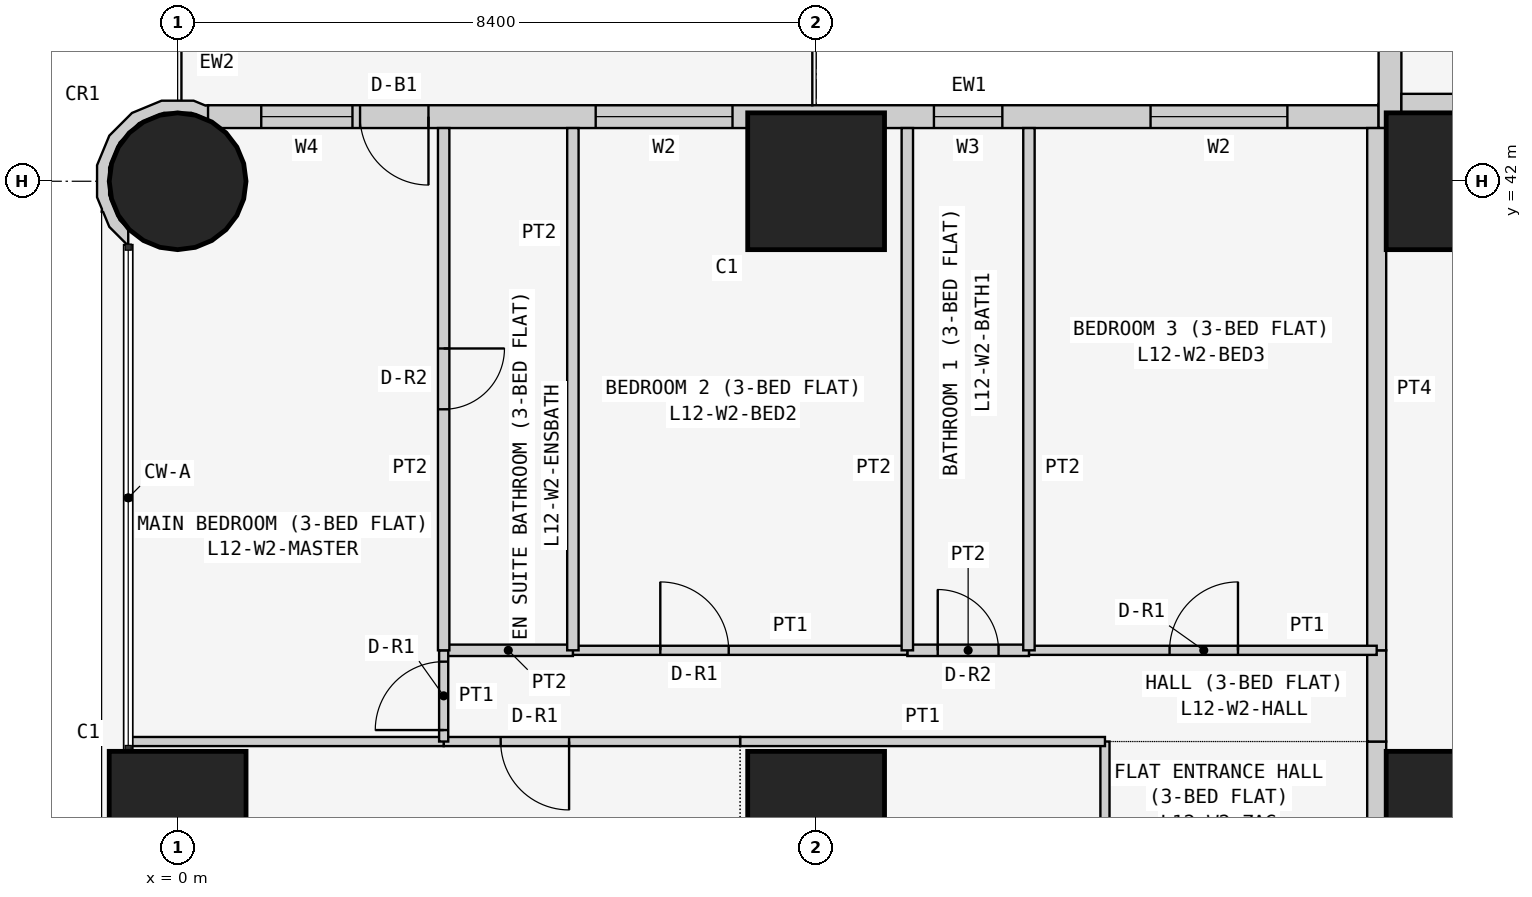
"""IFC4 building model, lengths in metres.
Left out: names, types, materials, properties, quantities, classifications, styles, units other than length and angle.
Written with IfcOpenShell. Run it as: python <this file> out.ifc"""

import sys

from ifc_helpers import new_model, si_unit, direction, frame, frame_2d, origin, origin_2d, place, context, subcontext, project, spatial, polyline, rectangle, circle, outline, extrude, element, fill, save


model = new_model("IFC4")
c1 = context("Model", 3, precision=1e-05, world=origin(), true_north=direction((0.0, 1.0)))
c2 = subcontext(c1, "Body", "Model", "MODEL_VIEW")
j1 = project(units=[si_unit("LENGTHUNIT", "METRE"), si_unit("PLANEANGLEUNIT", "RADIAN")], contexts=[c1])
p1 = place(None, origin())
s1 = spatial("IfcSite", under=j1, at=p1, CompositionType="ELEMENT")
p2 = place(p1, origin())
s2 = spatial("IfcBuilding", under=s1, at=p2, CompositionType="ELEMENT")
p3 = place(p2, frame((0.0, 0.0, 52.5)))
s3 = spatial("IfcBuildingStorey", under=s2, at=p3, CompositionType="ELEMENT", Elevation=52.5)
p4 = place(p3, frame((0.0, 33.6, 0.0), z_axis=(0.0, 0.0, 1.0), x_axis=(1.0, 0.0, 0.0)))
e1 = element("IfcColumn", 1, at=p4, inside=s3, PredefinedType="COLUMN", context=c2, shape_type="SweptSolid", body=[
    extrude(rectangle(XDim=1.8, YDim=1.8, at=origin_2d()), origin(), (0.0, 0.0, 1.0), 3.6),
])
p5 = place(p3, frame((0.0, 42.0, 0.0), z_axis=(0.0, 0.0, 1.0), x_axis=(1.0, 0.0, 0.0)))
e2 = element("IfcColumn", 2, at=p5, inside=s3, PredefinedType="COLUMN", context=c2, shape_type="SweptSolid", body=[
    extrude(circle(Radius=0.9, at=origin_2d()), origin(), (0.0, 0.0, 1.0), 3.6),
])
for number, where, z_axis, x_axis in (
    (3, (8.4, 33.6, 0.0), (0.0, 0.0, 1.0), (1.0, 0.0, 0.0)),
    (4, (8.4, 42.0, 0.0), (0.0, 0.0, 1.0), (1.0, 0.0, 0.0)),
    (5, (16.8, 33.6, 0.0), (0.0, 0.0, 1.0), (1.0, 0.0, 0.0)),
    (6, (16.8, 42.0, 0.0), (0.0, 0.0, 1.0), (1.0, 0.0, 0.0)),
):
    element("IfcColumn", number, at=place(p3, frame(where, z_axis=z_axis, x_axis=x_axis)), inside=s3, PredefinedType="COLUMN", context=c2, shape_type="SweptSolid", body=[
        extrude(rectangle(XDim=1.8, YDim=1.8, at=origin_2d()), origin(), (0.0, 0.0, 1.0), 3.6),
    ])
p6 = place(p3, frame((15.8, 42.85, 0.0), z_axis=(0.0, 0.0, 1.0), x_axis=(-1.0, 0.0, 0.0)))
e7 = element("IfcWall", 7, at=p6, inside=s3, PredefinedType="SOLIDWALL", context=c2, shape_type="SweptSolid", body=[
    extrude(rectangle(XDim=15.4, YDim=0.3, at=frame_2d((7.7, 0.0))), origin(), (0.0, 0.0, 1.0), 3.45),
])
p7 = place(p6, frame((1.2, 0.0, 0.9)))
e8 = element("IfcOpeningElement", 8, at=p7, cuts=e7, PredefinedType="OPENING", context=c2, shape_type="SweptSolid", body=[
    extrude(rectangle(XDim=1.8, YDim=1.5, at=frame_2d((0.9, 0.75))), frame((0.0, 0.16, 0.0), z_axis=(0.0, -1.0, 0.0), x_axis=(1.0, 0.0, 0.0)), (0.0, 0.0, 1.0), 0.32),
])
p8 = place(p6, frame((4.95, 0.0, 1.5)))
e9 = element("IfcOpeningElement", 9, at=p8, cuts=e7, PredefinedType="OPENING", context=c2, shape_type="SweptSolid", body=[
    extrude(rectangle(XDim=0.9, YDim=0.7, at=frame_2d((0.45, 0.35))), frame((0.0, 0.16, 0.0), z_axis=(0.0, -1.0, 0.0), x_axis=(1.0, 0.0, 0.0)), (0.0, 0.0, 1.0), 0.32),
])
p9 = place(p6, frame((8.5, 0.0, 0.9)))
e10 = element("IfcOpeningElement", 10, at=p9, cuts=e7, PredefinedType="OPENING", context=c2, shape_type="SweptSolid", body=[
    extrude(rectangle(XDim=1.8, YDim=1.5, at=frame_2d((0.9, 0.75))), frame((0.0, 0.16, 0.0), z_axis=(0.0, -1.0, 0.0), x_axis=(1.0, 0.0, 0.0)), (0.0, 0.0, 1.0), 0.32),
])
p10 = place(p6, frame((12.5, 0.0, 0.0)))
e11 = element("IfcOpeningElement", 11, at=p10, cuts=e7, PredefinedType="OPENING", context=c2, shape_type="SweptSolid", body=[
    extrude(rectangle(XDim=0.9, YDim=2.4, at=frame_2d((0.45, 1.2))), frame((0.0, 0.16, 0.0), z_axis=(0.0, -1.0, 0.0), x_axis=(1.0, 0.0, 0.0)), (0.0, 0.0, 1.0), 0.32),
])
p11 = place(p6, frame((13.5, 0.0, 0.9)))
e12 = element("IfcOpeningElement", 12, at=p11, cuts=e7, PredefinedType="OPENING", context=c2, shape_type="SweptSolid", body=[
    extrude(rectangle(XDim=1.2, YDim=1.5, at=frame_2d((0.6, 0.75))), frame((0.0, 0.16, 0.0), z_axis=(0.0, -1.0, 0.0), x_axis=(1.0, 0.0, 0.0)), (0.0, 0.0, 1.0), 0.32),
])
p12 = place(p3, frame((15.95, 58.4, 0.0), z_axis=(0.0, 0.0, 1.0), x_axis=(0.0, -1.0, 0.0)))
e13 = element("IfcWall", 13, at=p12, inside=s3, PredefinedType="SOLIDWALL", context=c2, shape_type="SweptSolid", body=[
    extrude(rectangle(XDim=15.7, YDim=0.3, at=frame_2d((7.85, 0.0))), origin(), (0.0, 0.0, 1.0), 3.45),
])
p13 = place(p12, frame((12.4, 0.0, 0.9)))
e14 = element("IfcOpeningElement", 14, at=p13, cuts=e13, PredefinedType="OPENING", context=c2, shape_type="SweptSolid", body=[
    extrude(rectangle(XDim=1.8, YDim=1.5, at=frame_2d((0.9, 0.75))), frame((0.0, 0.16, 0.0), z_axis=(0.0, -1.0, 0.0), x_axis=(1.0, 0.0, 0.0)), (0.0, 0.0, 1.0), 0.32),
])
p14 = place(p12, frame((9.55, 0.0, 1.5)))
e15 = element("IfcOpeningElement", 15, at=p14, cuts=e13, PredefinedType="OPENING", context=c2, shape_type="SweptSolid", body=[
    extrude(rectangle(XDim=0.9, YDim=0.7, at=frame_2d((0.45, 0.35))), frame((0.0, 0.16, 0.0), z_axis=(0.0, -1.0, 0.0), x_axis=(1.0, 0.0, 0.0)), (0.0, 0.0, 1.0), 0.32),
])
p15 = place(p12, frame((5.1, 0.0, 0.9)))
e16 = element("IfcOpeningElement", 16, at=p15, cuts=e13, PredefinedType="OPENING", context=c2, shape_type="SweptSolid", body=[
    extrude(rectangle(XDim=1.8, YDim=1.5, at=frame_2d((0.9, 0.75))), frame((0.0, 0.16, 0.0), z_axis=(0.0, -1.0, 0.0), x_axis=(1.0, 0.0, 0.0)), (0.0, 0.0, 1.0), 0.32),
])
p16 = place(p12, frame((2.0, 0.0, 0.0)))
e17 = element("IfcOpeningElement", 17, at=p16, cuts=e13, PredefinedType="OPENING", context=c2, shape_type="SweptSolid", body=[
    extrude(rectangle(XDim=0.9, YDim=2.4, at=frame_2d((0.45, 1.2))), frame((0.0, 0.16, 0.0), z_axis=(0.0, -1.0, 0.0), x_axis=(1.0, 0.0, 0.0)), (0.0, 0.0, 1.0), 0.32),
])
p17 = place(p12, frame((0.7, 0.0, 0.9)))
e18 = element("IfcOpeningElement", 18, at=p17, cuts=e13, PredefinedType="OPENING", context=c2, shape_type="SweptSolid", body=[
    extrude(rectangle(XDim=1.2, YDim=1.5, at=frame_2d((0.6, 0.75))), frame((0.0, 0.16, 0.0), z_axis=(0.0, -1.0, 0.0), x_axis=(1.0, 0.0, 0.0)), (0.0, 0.0, 1.0), 0.32),
])
p18 = place(p3, frame((0.364, 42.91, 0.0), z_axis=(0.0, 0.0, 1.0), x_axis=(-0.926129809145, 0.377204953059, 0.0)))
e19 = element("IfcWall", 19, at=p18, inside=s3, PredefinedType="SOLIDWALL", context=c2, shape_type="SweptSolid", body=[
    extrude(outline(polyline([(0.36, 1.803), (0.509, 1.741), (0.761, 1.486), (0.896, 1.154), (0.894, 0.795), (0.755, 0.465), (0.5, 0.213), (0.168, 0.078), (-0.1, 0.08), (0.001, -0.097), (0.03, -0.08), (0.199, -0.081), (0.589, 0.078), (0.889, 0.374), (1.053, 0.763), (1.055, 1.185), (0.896, 1.575), (0.778, 1.695), (0.769, 1.728), (0.75, 1.723), (0.6, 1.875), (0.295, 2.003), (0.281, 1.998), (0.36, 1.803)])), origin(), (0.0, 0.0, 1.0), 3.45),
])
p19 = place(p3, frame((16.1, 43.025, 0.0), z_axis=(0.0, 0.0, 1.0), x_axis=(1.0, 0.0, 0.0)))
e20 = element("IfcWall", 20, at=p19, inside=s3, PredefinedType="PARTITIONING", context=c2, shape_type="SweptSolid", body=[
    extrude(rectangle(XDim=6.871, YDim=0.25, at=frame_2d((3.436, 0.0))), origin(), (0.0, 0.0, 1.0), 3.45),
])
p20 = place(p3, frame((15.775, 29.4, 0.0), z_axis=(0.0, 0.0, 1.0), x_axis=(0.0, 1.0, 0.0)))
e21 = element("IfcWall", 21, at=p20, inside=s3, PredefinedType="PARTITIONING", context=c2, shape_type="SweptSolid", body=[
    extrude(rectangle(XDim=5.229, YDim=0.25, at=frame_2d((2.615, 0.0))), origin(), (0.0, 0.0, 1.0), 3.45),
])
p21 = place(p20, frame((2.1, 0.0, 0.0)))
e22 = element("IfcOpeningElement", 22, at=p21, cuts=e21, PredefinedType="OPENING", context=c2, shape_type="SweptSolid", body=[
    extrude(rectangle(XDim=1.0, YDim=2.1, at=frame_2d((0.5, 1.05))), frame((0.0, 0.135, 0.0), z_axis=(0.0, -1.0, 0.0), x_axis=(1.0, 0.0, 0.0)), (0.0, 0.0, 1.0), 0.27),
])
p22 = place(p3, frame((15.775, 34.629, 0.0), z_axis=(0.0, 0.0, 1.0), x_axis=(0.0, 1.0, 0.0)))
e23 = element("IfcWall", 23, at=p22, inside=s3, PredefinedType="PARTITIONING", context=c2, shape_type="SweptSolid", body=[
    extrude(rectangle(XDim=1.2, YDim=0.25, at=frame_2d((0.6, 0.0))), origin(), (0.0, 0.0, 1.0), 3.45),
])
p23 = place(p3, frame((15.775, 35.829, 0.0), z_axis=(0.0, 0.0, 1.0), x_axis=(0.0, 1.0, 0.0)))
e24 = element("IfcWall", 24, at=p23, inside=s3, PredefinedType="PARTITIONING", context=c2, shape_type="SweptSolid", body=[
    extrude(rectangle(XDim=6.871, YDim=0.25, at=frame_2d((3.436, 0.0))), origin(), (0.0, 0.0, 1.0), 3.45),
])
p24 = place(p3, frame((12.2, 29.4, 0.0), z_axis=(0.0, 0.0, 1.0), x_axis=(0.0, 1.0, 0.0)))
e25 = element("IfcWall", 25, at=p24, inside=s3, PredefinedType="PARTITIONING", context=c2, shape_type="SweptSolid", body=[
    extrude(rectangle(XDim=5.229, YDim=0.12, at=frame_2d((2.615, 0.0))), origin(), (0.0, 0.0, 1.0), 3.45),
])
p25 = place(p24, frame((1.05, 0.0, 0.0)))
e26 = element("IfcOpeningElement", 26, at=p25, cuts=e25, PredefinedType="OPENING", context=c2, shape_type="SweptSolid", body=[
    extrude(rectangle(XDim=0.9, YDim=2.1, at=frame_2d((0.45, 1.05))), frame((0.0, 0.07, 0.0), z_axis=(0.0, -1.0, 0.0), x_axis=(1.0, 0.0, 0.0)), (0.0, 0.0, 1.0), 0.14),
])
p26 = place(p3, frame((7.4, 34.629, 0.0), z_axis=(0.0, 0.0, 1.0), x_axis=(1.0, 0.0, 0.0)))
e27 = element("IfcWall", 27, at=p26, inside=s3, PredefinedType="PARTITIONING", context=c2, shape_type="SweptSolid", body=[
    extrude(rectangle(XDim=4.8, YDim=0.12, at=frame_2d((2.4, 0.0))), origin(), (0.0, 0.0, 1.0), 3.45),
])
p27 = place(p3, frame((3.5, 34.629, 0.0), z_axis=(0.0, 0.0, 1.0), x_axis=(1.0, 0.0, 0.0)))
e28 = element("IfcWall", 28, at=p27, inside=s3, PredefinedType="PARTITIONING", context=c2, shape_type="SweptSolid", body=[
    extrude(rectangle(XDim=3.9, YDim=0.12, at=frame_2d((1.95, 0.0))), origin(), (0.0, 0.0, 1.0), 3.45),
])
p28 = place(p27, frame((0.75, 0.0, 0.0)))
e29 = element("IfcOpeningElement", 29, at=p28, cuts=e28, PredefinedType="OPENING", context=c2, shape_type="SweptSolid", body=[
    extrude(rectangle(XDim=0.9, YDim=2.1, at=frame_2d((0.45, 1.05))), frame((0.0, 0.07, 0.0), z_axis=(0.0, -1.0, 0.0), x_axis=(1.0, 0.0, 0.0)), (0.0, 0.0, 1.0), 0.14),
])
p29 = place(p3, frame((-0.65, 34.629, 0.0), z_axis=(0.0, 0.0, 1.0), x_axis=(1.0, 0.0, 0.0)))
e30 = element("IfcWall", 30, at=p29, inside=s3, PredefinedType="PARTITIONING", context=c2, shape_type="SweptSolid", body=[
    extrude(rectangle(XDim=4.15, YDim=0.12, at=frame_2d((2.075, 0.0))), origin(), (0.0, 0.0, 1.0), 3.45),
])
p30 = place(p3, frame((11.2, 35.829, 0.0), z_axis=(0.0, 0.0, 1.0), x_axis=(1.0, 0.0, 0.0)))
e31 = element("IfcWall", 31, at=p30, inside=s3, PredefinedType="PARTITIONING", context=c2, shape_type="SweptSolid", body=[
    extrude(rectangle(XDim=4.575, YDim=0.12, at=frame_2d((2.288, 0.0))), origin(), (0.0, 0.0, 1.0), 3.45),
])
p31 = place(p30, frame((1.85, 0.0, 0.0)))
e32 = element("IfcOpeningElement", 32, at=p31, cuts=e31, PredefinedType="OPENING", context=c2, shape_type="SweptSolid", body=[
    extrude(rectangle(XDim=0.9, YDim=2.1, at=frame_2d((0.45, 1.05))), frame((0.0, 0.07, 0.0), z_axis=(0.0, -1.0, 0.0), x_axis=(1.0, 0.0, 0.0)), (0.0, 0.0, 1.0), 0.14),
])
p32 = place(p3, frame((9.6, 35.829, 0.0), z_axis=(0.0, 0.0, 1.0), x_axis=(1.0, 0.0, 0.0)))
e33 = element("IfcWall", 33, at=p32, inside=s3, PredefinedType="PARTITIONING", context=c2, shape_type="SweptSolid", body=[
    extrude(rectangle(XDim=1.6, YDim=0.15, at=frame_2d((0.8, 0.0))), origin(), (0.0, 0.0, 1.0), 3.45),
])
p33 = place(p32, frame((0.4, 0.0, 0.0)))
e34 = element("IfcOpeningElement", 34, at=p33, cuts=e33, PredefinedType="OPENING", context=c2, shape_type="SweptSolid", body=[
    extrude(rectangle(XDim=0.8, YDim=2.1, at=frame_2d((0.4, 1.05))), frame((0.0, 0.085, 0.0), z_axis=(0.0, -1.0, 0.0), x_axis=(1.0, 0.0, 0.0)), (0.0, 0.0, 1.0), 0.17),
])
p34 = place(p3, frame((5.2, 35.829, 0.0), z_axis=(0.0, 0.0, 1.0), x_axis=(1.0, 0.0, 0.0)))
e35 = element("IfcWall", 35, at=p34, inside=s3, PredefinedType="PARTITIONING", context=c2, shape_type="SweptSolid", body=[
    extrude(rectangle(XDim=4.4, YDim=0.12, at=frame_2d((2.2, 0.0))), origin(), (0.0, 0.0, 1.0), 3.45),
])
p35 = place(p34, frame((1.15, 0.0, 0.0)))
e36 = element("IfcOpeningElement", 36, at=p35, cuts=e35, PredefinedType="OPENING", context=c2, shape_type="SweptSolid", body=[
    extrude(rectangle(XDim=0.9, YDim=2.1, at=frame_2d((0.45, 1.05))), frame((0.0, 0.07, 0.0), z_axis=(0.0, -1.0, 0.0), x_axis=(1.0, 0.0, 0.0)), (0.0, 0.0, 1.0), 0.14),
])
p36 = place(p3, frame((3.5, 35.829, 0.0), z_axis=(0.0, 0.0, 1.0), x_axis=(1.0, 0.0, 0.0)))
e37 = element("IfcWall", 37, at=p36, inside=s3, PredefinedType="PARTITIONING", context=c2, shape_type="SweptSolid", body=[
    extrude(rectangle(XDim=1.7, YDim=0.15, at=frame_2d((0.85, 0.0))), origin(), (0.0, 0.0, 1.0), 3.45),
])
p37 = place(p3, frame((3.5, 34.629, 0.0), z_axis=(0.0, 0.0, 1.0), x_axis=(0.0, 1.0, 0.0)))
e38 = element("IfcWall", 38, at=p37, inside=s3, PredefinedType="PARTITIONING", context=c2, shape_type="SweptSolid", body=[
    extrude(rectangle(XDim=1.2, YDim=0.12, at=frame_2d((0.6, 0.0))), origin(), (0.0, 0.0, 1.0), 3.45),
])
p38 = place(p37, frame((0.151, 0.0, 0.0)))
e39 = element("IfcOpeningElement", 39, at=p38, cuts=e38, PredefinedType="OPENING", context=c2, shape_type="SweptSolid", body=[
    extrude(rectangle(XDim=0.9, YDim=2.1, at=frame_2d((0.45, 1.05))), frame((0.0, 0.07, 0.0), z_axis=(0.0, -1.0, 0.0), x_axis=(1.0, 0.0, 0.0)), (0.0, 0.0, 1.0), 0.14),
])
for number, where, z_axis, x_axis in (
    (40, (11.2, 35.829, 0.0), (0.0, 0.0, 1.0), (0.0, 1.0, 0.0)),
    (41, (9.6, 35.829, 0.0), (0.0, 0.0, 1.0), (0.0, 1.0, 0.0)),
    (42, (5.2, 35.829, 0.0), (0.0, 0.0, 1.0), (0.0, 1.0, 0.0)),
):
    element("IfcWall", number, at=place(p3, frame(where, z_axis=z_axis, x_axis=x_axis)), inside=s3, PredefinedType="PARTITIONING", context=c2, shape_type="SweptSolid", body=[
        extrude(rectangle(XDim=6.871, YDim=0.15, at=frame_2d((3.436, 0.0))), origin(), (0.0, 0.0, 1.0), 3.45),
    ])
p39 = place(p3, frame((3.5, 35.829, 0.0), z_axis=(0.0, 0.0, 1.0), x_axis=(0.0, 1.0, 0.0)))
e43 = element("IfcWall", 43, at=p39, inside=s3, PredefinedType="PARTITIONING", context=c2, shape_type="SweptSolid", body=[
    extrude(rectangle(XDim=6.871, YDim=0.15, at=frame_2d((3.436, 0.0))), origin(), (0.0, 0.0, 1.0), 3.45),
])
p40 = place(p39, frame((3.171, 0.0, 0.0)))
e44 = element("IfcOpeningElement", 44, at=p40, cuts=e43, PredefinedType="OPENING", context=c2, shape_type="SweptSolid", body=[
    extrude(rectangle(XDim=0.8, YDim=2.1, at=frame_2d((0.4, 1.05))), frame((0.0, 0.085, 0.0), z_axis=(0.0, -1.0, 0.0), x_axis=(1.0, 0.0, 0.0)), (0.0, 0.0, 1.0), 0.17),
])
p41 = place(p7, origin())
e45 = element("IfcWindow", 45, at=p41, inside=s3, PartitioningType="SINGLE_PANEL", PredefinedType="WINDOW", context=c2, shape_type="SweptSolid", body=[
    extrude(rectangle(XDim=1.8, YDim=1.5, at=frame_2d((0.9, 0.75))), frame((0.0, 0.03, 0.0), z_axis=(0.0, -1.0, 0.0), x_axis=(1.0, 0.0, 0.0)), (0.0, 0.0, 1.0), 0.06),
])
fill(e8, e45)
p42 = place(p8, origin())
e46 = element("IfcWindow", 46, at=p42, inside=s3, PartitioningType="SINGLE_PANEL", PredefinedType="WINDOW", context=c2, shape_type="SweptSolid", body=[
    extrude(rectangle(XDim=0.9, YDim=0.7, at=frame_2d((0.45, 0.35))), frame((0.0, 0.03, 0.0), z_axis=(0.0, -1.0, 0.0), x_axis=(1.0, 0.0, 0.0)), (0.0, 0.0, 1.0), 0.06),
])
fill(e9, e46)
p43 = place(p9, origin())
e47 = element("IfcWindow", 47, at=p43, inside=s3, PartitioningType="SINGLE_PANEL", PredefinedType="WINDOW", context=c2, shape_type="SweptSolid", body=[
    extrude(rectangle(XDim=1.8, YDim=1.5, at=frame_2d((0.9, 0.75))), frame((0.0, 0.03, 0.0), z_axis=(0.0, -1.0, 0.0), x_axis=(1.0, 0.0, 0.0)), (0.0, 0.0, 1.0), 0.06),
])
fill(e10, e47)
p44 = place(p10, origin())
e48 = element("IfcDoor", 48, at=p44, inside=s3, OperationType="SINGLE_SWING_LEFT", PredefinedType="DOOR", context=c2, shape_type="SweptSolid", body=[
    extrude(rectangle(XDim=0.9, YDim=2.4, at=frame_2d((0.45, 1.2))), frame((0.0, 0.025, 0.0), z_axis=(0.0, -1.0, 0.0), x_axis=(1.0, 0.0, 0.0)), (0.0, 0.0, 1.0), 0.05),
])
fill(e11, e48)
p45 = place(p11, origin())
e49 = element("IfcWindow", 49, at=p45, inside=s3, PartitioningType="SINGLE_PANEL", PredefinedType="WINDOW", context=c2, shape_type="SweptSolid", body=[
    extrude(rectangle(XDim=1.2, YDim=1.5, at=frame_2d((0.6, 0.75))), frame((0.0, 0.03, 0.0), z_axis=(0.0, -1.0, 0.0), x_axis=(1.0, 0.0, 0.0)), (0.0, 0.0, 1.0), 0.06),
])
fill(e12, e49)
p46 = place(p28, frame((0.9, 0.0, 0.0), z_axis=(0.0, 0.0, 1.0), x_axis=(-1.0, 0.0, 0.0)))
e50 = element("IfcDoor", 50, at=p46, inside=s3, OperationType="SINGLE_SWING_LEFT", PredefinedType="DOOR", context=c2, shape_type="SweptSolid", body=[
    extrude(rectangle(XDim=0.9, YDim=2.1, at=frame_2d((0.45, 1.05))), frame((0.0, 0.025, 0.0), z_axis=(0.0, -1.0, 0.0), x_axis=(1.0, 0.0, 0.0)), (0.0, 0.0, 1.0), 0.05),
])
fill(e29, e50)
p47 = place(p31, origin())
e51 = element("IfcDoor", 51, at=p47, inside=s3, OperationType="SINGLE_SWING_RIGHT", PredefinedType="DOOR", context=c2, shape_type="SweptSolid", body=[
    extrude(rectangle(XDim=0.9, YDim=2.1, at=frame_2d((0.45, 1.05))), frame((0.0, 0.025, 0.0), z_axis=(0.0, -1.0, 0.0), x_axis=(1.0, 0.0, 0.0)), (0.0, 0.0, 1.0), 0.05),
])
fill(e32, e51)
p48 = place(p33, origin())
e52 = element("IfcDoor", 52, at=p48, inside=s3, OperationType="SINGLE_SWING_LEFT", PredefinedType="DOOR", context=c2, shape_type="SweptSolid", body=[
    extrude(rectangle(XDim=0.8, YDim=2.1, at=frame_2d((0.4, 1.05))), frame((0.0, 0.025, 0.0), z_axis=(0.0, -1.0, 0.0), x_axis=(1.0, 0.0, 0.0)), (0.0, 0.0, 1.0), 0.05),
])
fill(e34, e52)
p49 = place(p35, origin())
e53 = element("IfcDoor", 53, at=p49, inside=s3, OperationType="SINGLE_SWING_LEFT", PredefinedType="DOOR", context=c2, shape_type="SweptSolid", body=[
    extrude(rectangle(XDim=0.9, YDim=2.1, at=frame_2d((0.45, 1.05))), frame((0.0, 0.025, 0.0), z_axis=(0.0, -1.0, 0.0), x_axis=(1.0, 0.0, 0.0)), (0.0, 0.0, 1.0), 0.05),
])
fill(e36, e53)
p50 = place(p38, origin())
e54 = element("IfcDoor", 54, at=p50, inside=s3, OperationType="SINGLE_SWING_LEFT", PredefinedType="DOOR", context=c2, shape_type="SweptSolid", body=[
    extrude(rectangle(XDim=0.9, YDim=2.1, at=frame_2d((0.45, 1.05))), frame((0.0, 0.025, 0.0), z_axis=(0.0, -1.0, 0.0), x_axis=(1.0, 0.0, 0.0)), (0.0, 0.0, 1.0), 0.05),
])
fill(e39, e54)
p51 = place(p40, frame((0.8, 0.0, 0.0), z_axis=(0.0, 0.0, 1.0), x_axis=(-1.0, 0.0, 0.0)))
e55 = element("IfcDoor", 55, at=p51, inside=s3, OperationType="SINGLE_SWING_LEFT", PredefinedType="DOOR", context=c2, shape_type="SweptSolid", body=[
    extrude(rectangle(XDim=0.8, YDim=2.1, at=frame_2d((0.4, 1.05))), frame((0.0, 0.025, 0.0), z_axis=(0.0, -1.0, 0.0), x_axis=(1.0, 0.0, 0.0)), (0.0, 0.0, 1.0), 0.05),
])
fill(e44, e55)
save(model, sys.argv[1])
